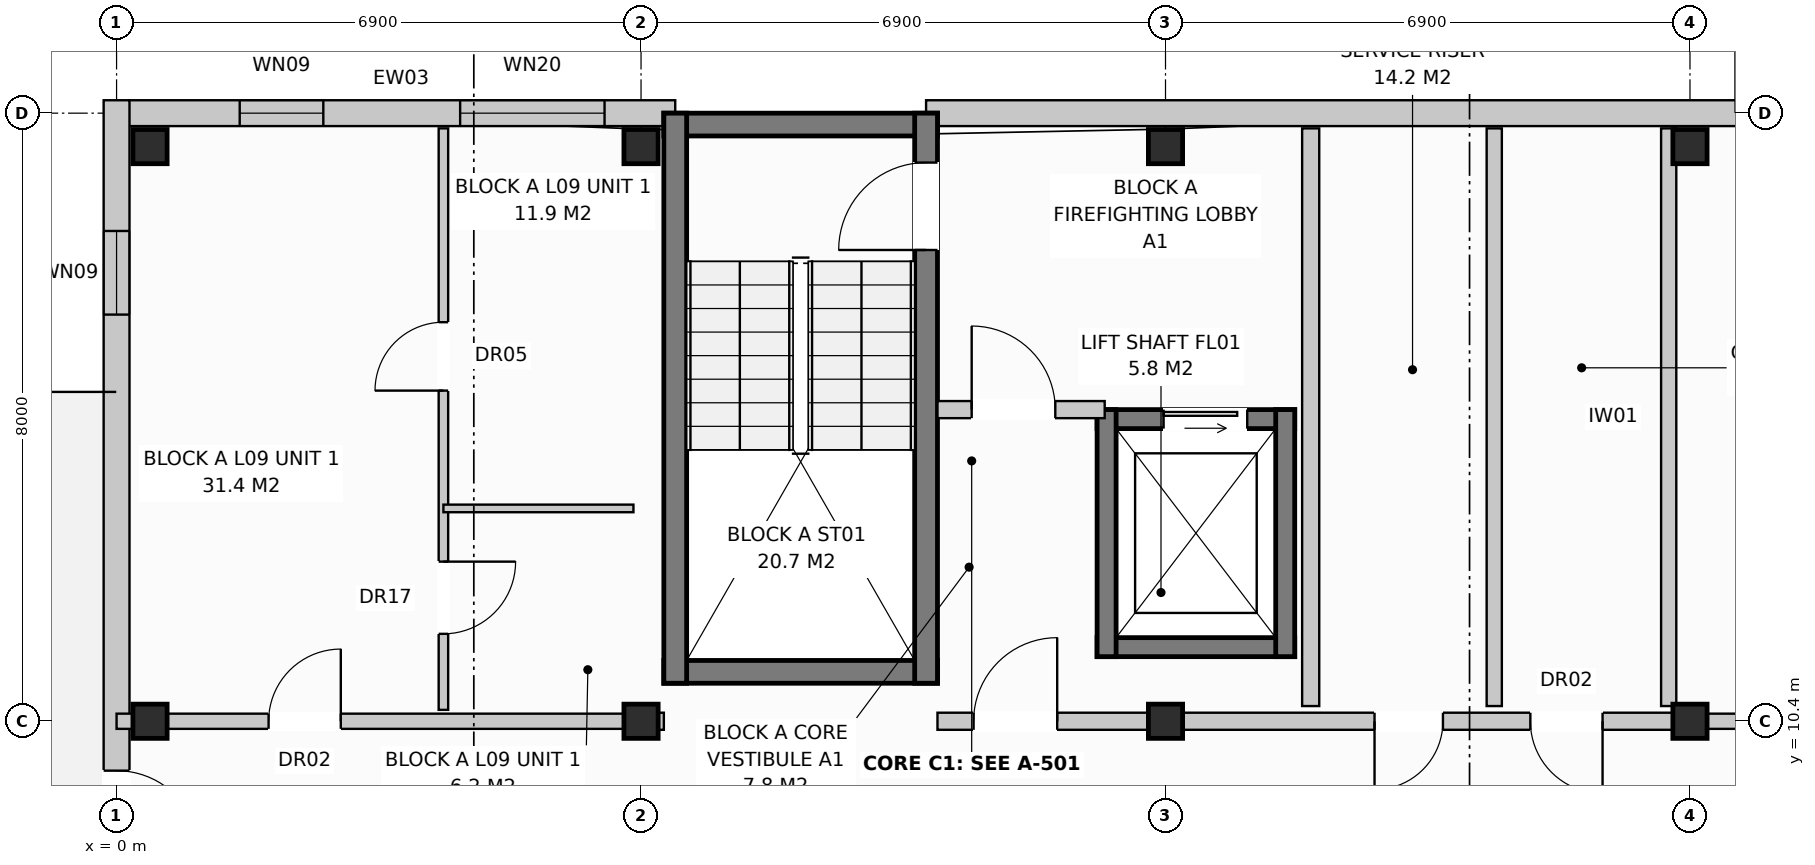
"""IFC4 building model, lengths in metres.
Left out: names, types, materials, properties, quantities, classifications, styles, units other than length and angle.
Written with IfcOpenShell. Run it as: python <this file> out.ifc"""

import sys

from ifc_helpers import new_model, si_unit, direction, frame, frame_2d, origin, origin_with_axes, origin_2d, place, context, subcontext, project, spatial, rectangle, extrude, element, fill, save


model = new_model("IFC4")
c1 = context("Model", 3, precision=1e-05, world=origin(), true_north=direction((0.0, 1.0)))
c2 = subcontext(c1, "Body", "Model", "MODEL_VIEW")
j1 = project(units=[si_unit("LENGTHUNIT", "METRE"), si_unit("PLANEANGLEUNIT", "RADIAN")], contexts=[c1])
p1 = place(None, origin())
s1 = spatial("IfcSite", under=j1, at=p1, CompositionType="ELEMENT")
p2 = place(p1, origin())
s2 = spatial("IfcBuilding", under=s1, at=p2, CompositionType="ELEMENT")
p3 = place(p2, frame((0.0, 0.0, 30.4)))
s3 = spatial("IfcBuildingStorey", under=s2, at=p3, CompositionType="ELEMENT", Elevation=30.4)
for number, where, z_axis, x_axis in (
    (1, (0.44, 10.4, 0.0), (0.0, 0.0, 1.0), (1.0, 0.0, 0.0)),
    (2, (0.44, 17.96, 0.0), (0.0, 0.0, 1.0), (1.0, 0.0, 0.0)),
    (3, (6.9, 10.4, 0.0), (0.0, 0.0, 1.0), (1.0, 0.0, 0.0)),
    (4, (6.9, 17.96, 0.0), (0.0, 0.0, 1.0), (1.0, 0.0, 0.0)),
    (5, (13.8, 10.4, 0.0), (0.0, 0.0, 1.0), (1.0, 0.0, 0.0)),
    (6, (13.8, 17.96, 0.0), (0.0, 0.0, 1.0), (1.0, 0.0, 0.0)),
    (7, (20.7, 10.4, 0.0), (0.0, 0.0, 1.0), (1.0, 0.0, 0.0)),
    (8, (20.7, 17.96, 0.0), (0.0, 0.0, 1.0), (1.0, 0.0, 0.0)),
):
    element("IfcColumn", number, at=place(p3, frame(where, z_axis=z_axis, x_axis=x_axis)), inside=s3, PredefinedType="COLUMN", context=c2, shape_type="SweptSolid", body=[
        extrude(rectangle(XDim=0.45, YDim=0.45, at=origin_2d()), origin(), (0.0, 0.0, 1.0), 3.2),
    ])
p4 = place(p3, frame((0.16, 18.4, 0.0), z_axis=(0.0, 0.0, 1.0), x_axis=(1.0, 0.0, 0.0)))
e9 = element("IfcWall", 9, at=p4, inside=s3, PredefinedType="STANDARD", context=c2, shape_type="SweptSolid", body=[
    extrude(rectangle(XDim=7.19, YDim=0.34, at=frame_2d((3.595, 0.0))), origin(), (0.0, 0.0, 1.0), 2.96),
])
p5 = place(p4, frame((1.46, 0.0, 0.72)))
e10 = element("IfcOpeningElement", 10, at=p5, cuts=e9, PredefinedType="OPENING", context=c2, shape_type="SweptSolid", body=[
    extrude(rectangle(XDim=1.1, YDim=1.5, at=frame_2d((0.55, 0.75))), frame((0.0, 0.182, 0.0), z_axis=(0.0, -1.0, 0.0), x_axis=(1.0, 0.0, 0.0)), (0.0, 0.0, 1.0), 0.364),
])
p6 = place(p4, frame((4.36, 0.0, 0.8)))
e11 = element("IfcOpeningElement", 11, at=p6, cuts=e9, PredefinedType="OPENING", context=c2, shape_type="SweptSolid", body=[
    extrude(rectangle(XDim=1.9, YDim=1.85, at=frame_2d((0.95, 0.925))), frame((0.0, 0.182, 0.0), z_axis=(0.0, -1.0, 0.0), x_axis=(1.0, 0.0, 0.0)), (0.0, 0.0, 1.0), 0.364),
])
p7 = place(p3, frame((10.65, 18.4, 0.0), z_axis=(0.0, 0.0, 1.0), x_axis=(1.0, 0.0, 0.0)))
e12 = element("IfcWall", 12, at=p7, inside=s3, PredefinedType="STANDARD", context=c2, shape_type="SweptSolid", body=[
    extrude(rectangle(XDim=17.4, YDim=0.34, at=frame_2d((8.7, 0.0))), origin(), (0.0, 0.0, 1.0), 2.96),
])
p8 = place(p7, frame((11.87, 0.0, 0.0)))
e13 = element("IfcOpeningElement", 13, at=p8, cuts=e12, PredefinedType="OPENING", context=c2, shape_type="SweptSolid", body=[
    extrude(rectangle(XDim=0.95, YDim=2.1, at=frame_2d((0.475, 1.05))), frame((0.0, 0.182, 0.0), z_axis=(0.0, -1.0, 0.0), x_axis=(1.0, 0.0, 0.0)), (0.0, 0.0, 1.0), 0.364),
])
p9 = place(p7, frame((14.87, 0.0, 0.72)))
e14 = element("IfcOpeningElement", 14, at=p9, cuts=e12, PredefinedType="OPENING", context=c2, shape_type="SweptSolid", body=[
    extrude(rectangle(XDim=1.1, YDim=1.5, at=frame_2d((0.55, 0.75))), frame((0.0, 0.182, 0.0), z_axis=(0.0, -1.0, 0.0), x_axis=(1.0, 0.0, 0.0)), (0.0, 0.0, 1.0), 0.364),
])
p10 = place(p3, frame((0.0, -0.17, 0.0), z_axis=(0.0, 0.0, 1.0), x_axis=(0.0, 1.0, 0.0)))
e15 = element("IfcWall", 15, at=p10, inside=s3, PredefinedType="STANDARD", context=c2, shape_type="SweptSolid", body=[
    extrude(rectangle(XDim=18.74, YDim=0.34, at=frame_2d((9.37, 0.0))), origin(), (0.0, 0.0, 1.0), 2.96),
])
p11 = place(p10, frame((8.82, 0.0, 0.0)))
e16 = element("IfcOpeningElement", 16, at=p11, cuts=e15, PredefinedType="OPENING", context=c2, shape_type="SweptSolid", body=[
    extrude(rectangle(XDim=1.1, YDim=2.1, at=frame_2d((0.55, 1.05))), frame((0.0, 0.182, 0.0), z_axis=(0.0, -1.0, 0.0), x_axis=(1.0, 0.0, 0.0)), (0.0, 0.0, 1.0), 0.364),
])
p12 = place(p10, frame((1.72, 0.0, 0.72)))
e17 = element("IfcOpeningElement", 17, at=p12, cuts=e15, PredefinedType="OPENING", context=c2, shape_type="SweptSolid", body=[
    extrude(rectangle(XDim=1.1, YDim=1.5, at=frame_2d((0.55, 0.75))), frame((0.0, 0.182, 0.0), z_axis=(0.0, -1.0, 0.0), x_axis=(1.0, 0.0, 0.0)), (0.0, 0.0, 1.0), 0.364),
])
p13 = place(p10, frame((15.92, 0.0, 0.72)))
e18 = element("IfcOpeningElement", 18, at=p13, cuts=e15, PredefinedType="OPENING", context=c2, shape_type="SweptSolid", body=[
    extrude(rectangle(XDim=1.1, YDim=1.5, at=frame_2d((0.55, 0.75))), frame((0.0, 0.182, 0.0), z_axis=(0.0, -1.0, 0.0), x_axis=(1.0, 0.0, 0.0)), (0.0, 0.0, 1.0), 0.364),
])
for number, where, z_axis, x_axis in (
    (19, (7.2, 18.25, 0.0), (0.0, 0.0, 1.0), (1.0, 0.0, 0.0)),
    (20, (7.2, 11.05, 0.0), (0.0, 0.0, 1.0), (1.0, 0.0, 0.0)),
):
    element("IfcWall", number, at=place(p3, frame(where, z_axis=z_axis, x_axis=x_axis)), inside=s3, PredefinedType="SHEAR", context=c2, shape_type="SweptSolid", body=[
        extrude(rectangle(XDim=3.6, YDim=0.3, at=frame_2d((1.8, 0.0))), origin(), (0.0, 0.0, 1.0), 2.96),
    ])
p14 = place(p3, frame((7.35, 10.9, 0.0), z_axis=(0.0, 0.0, 1.0), x_axis=(0.0, 1.0, 0.0)))
e21 = element("IfcWall", 21, at=p14, inside=s3, PredefinedType="SHEAR", context=c2, shape_type="SweptSolid", body=[
    extrude(rectangle(XDim=7.5, YDim=0.3, at=frame_2d((3.75, 0.0))), origin(), (0.0, 0.0, 1.0), 2.96),
])
p15 = place(p3, frame((10.65, 10.9, 0.0), z_axis=(0.0, 0.0, 1.0), x_axis=(0.0, 1.0, 0.0)))
e22 = element("IfcWall", 22, at=p15, inside=s3, PredefinedType="SHEAR", context=c2, shape_type="SweptSolid", body=[
    extrude(rectangle(XDim=7.5, YDim=0.3, at=frame_2d((3.75, 0.0))), origin(), (0.0, 0.0, 1.0), 2.96),
])
p16 = place(p15, frame((5.7, 0.0, 0.0)))
e23 = element("IfcOpeningElement", 23, at=p16, cuts=e22, PredefinedType="OPENING", context=c2, shape_type="SweptSolid", body=[
    extrude(rectangle(XDim=1.15, YDim=2.15, at=frame_2d((0.575, 1.075))), frame((0.0, 0.162, 0.0), z_axis=(0.0, -1.0, 0.0), x_axis=(1.0, 0.0, 0.0)), (0.0, 0.0, 1.0), 0.324),
])
p17 = place(p3, frame((12.9, 14.375, 0.0), z_axis=(0.0, 0.0, 1.0), x_axis=(1.0, 0.0, 0.0)))
e24 = element("IfcWall", 24, at=p17, inside=s3, PredefinedType="SHEAR", context=c2, shape_type="SweptSolid", body=[
    extrude(rectangle(XDim=2.6, YDim=0.25, at=frame_2d((1.3, 0.0))), origin(), (0.0, 0.0, 1.0), 2.96),
])
p18 = place(p17, frame((0.875, 0.0, 0.0)))
e25 = element("IfcOpeningElement", 25, at=p18, cuts=e24, PredefinedType="OPENING", context=c2, shape_type="SweptSolid", body=[
    extrude(rectangle(XDim=1.1, YDim=2.1, at=frame_2d((0.55, 1.05))), frame((0.0, 0.137, 0.0), z_axis=(0.0, -1.0, 0.0), x_axis=(1.0, 0.0, 0.0)), (0.0, 0.0, 1.0), 0.274),
])
p19 = place(p3, frame((12.9, 11.375, 0.0), z_axis=(0.0, 0.0, 1.0), x_axis=(1.0, 0.0, 0.0)))
e26 = element("IfcWall", 26, at=p19, inside=s3, PredefinedType="SHEAR", context=c2, shape_type="SweptSolid", body=[
    extrude(rectangle(XDim=2.6, YDim=0.25, at=frame_2d((1.3, 0.0))), origin(), (0.0, 0.0, 1.0), 2.96),
])
for number, where, z_axis, x_axis in (
    (27, (13.025, 11.25, 0.0), (0.0, 0.0, 1.0), (0.0, 1.0, 0.0)),
    (28, (15.375, 11.25, 0.0), (0.0, 0.0, 1.0), (0.0, 1.0, 0.0)),
):
    element("IfcWall", number, at=place(p3, frame(where, z_axis=z_axis, x_axis=x_axis)), inside=s3, PredefinedType="SHEAR", context=c2, shape_type="SweptSolid", body=[
        extrude(rectangle(XDim=3.25, YDim=0.25, at=frame_2d((1.625, 0.0))), origin(), (0.0, 0.0, 1.0), 2.96),
    ])
p20 = place(p3, frame((15.71, 10.6, 0.0), z_axis=(0.0, 0.0, 1.0), x_axis=(0.0, 1.0, 0.0)))
e29 = element("IfcWall", 29, at=p20, inside=s3, PredefinedType="PARTITIONING", context=c2, shape_type="SweptSolid", body=[
    extrude(rectangle(XDim=7.6, YDim=0.225, at=frame_2d((3.8, 0.0))), origin(), (0.0, 0.0, 1.0), 2.59),
])
p21 = place(p3, frame((10.8, 14.5, 0.0), z_axis=(0.0, 0.0, 1.0), x_axis=(1.0, 0.0, 0.0)))
e30 = element("IfcWall", 30, at=p21, inside=s3, PredefinedType="PARTITIONING", context=c2, shape_type="SweptSolid", body=[
    extrude(rectangle(XDim=2.2, YDim=0.225, at=frame_2d((1.1, 0.0))), origin(), (0.0, 0.0, 1.0), 2.96),
])
p22 = place(p21, frame((0.45, 0.0, 0.0)))
e31 = element("IfcOpeningElement", 31, at=p22, cuts=e30, PredefinedType="OPENING", context=c2, shape_type="SweptSolid", body=[
    extrude(rectangle(XDim=1.1, YDim=2.15, at=frame_2d((0.55, 1.075))), frame((0.0, 0.125, 0.0), z_axis=(0.0, -1.0, 0.0), x_axis=(1.0, 0.0, 0.0)), (0.0, 0.0, 1.0), 0.249),
])
p23 = place(p3, frame((6.9, 10.4, 0.0), z_axis=(0.0, 0.0, 1.0), x_axis=(1.0, 0.0, 0.0)))
e32 = element("IfcWall", 32, at=p23, inside=s3, PredefinedType="PARTITIONING", context=c2, shape_type="SweptSolid", body=[
    extrude(rectangle(XDim=0.3, YDim=0.225, at=frame_2d((0.15, 0.0))), origin(), (0.0, 0.0, 1.0), 2.96),
])
for number, where, z_axis, x_axis in (
    (33, (18.125, 10.6, 0.0), (0.0, 0.0, 1.0), (0.0, 1.0, 0.0)),
    (34, (20.42, 10.6, 0.0), (0.0, 0.0, 1.0), (0.0, 1.0, 0.0)),
):
    element("IfcWall", number, at=place(p3, frame(where, z_axis=z_axis, x_axis=x_axis)), inside=s3, PredefinedType="PARTITIONING", context=c2, shape_type="SweptSolid", body=[
        extrude(rectangle(XDim=7.6, YDim=0.2, at=frame_2d((3.8, 0.0))), origin(), (0.0, 0.0, 1.0), 2.96),
    ])
p24 = place(p3, frame((10.8, 10.4, 0.0), z_axis=(0.0, 0.0, 1.0), x_axis=(1.0, 0.0, 0.0)))
e35 = element("IfcWall", 35, at=p24, inside=s3, PredefinedType="PARTITIONING", context=c2, shape_type="SweptSolid", body=[
    extrude(rectangle(XDim=9.9, YDim=0.225, at=frame_2d((4.95, 0.0))), origin(), (0.0, 0.0, 1.0), 2.4),
])
p25 = place(p24, frame((0.475, 0.0, 0.0)))
e36 = element("IfcOpeningElement", 36, at=p25, cuts=e35, PredefinedType="OPENING", context=c2, shape_type="SweptSolid", body=[
    extrude(rectangle(XDim=1.1, YDim=2.15, at=frame_2d((0.55, 1.075))), frame((0.0, 0.125, 0.0), z_axis=(0.0, -1.0, 0.0), x_axis=(1.0, 0.0, 0.0)), (0.0, 0.0, 1.0), 0.249),
])
p26 = place(p24, frame((5.75, 0.0, 0.0)))
e37 = element("IfcOpeningElement", 37, at=p26, cuts=e35, PredefinedType="OPENING", context=c2, shape_type="SweptSolid", body=[
    extrude(rectangle(XDim=0.9, YDim=2.1, at=frame_2d((0.45, 1.05))), frame((0.0, 0.125, 0.0), z_axis=(0.0, -1.0, 0.0), x_axis=(1.0, 0.0, 0.0)), (0.0, 0.0, 1.0), 0.249),
])
p27 = place(p24, frame((7.8, 0.0, 0.0)))
e38 = element("IfcOpeningElement", 38, at=p27, cuts=e35, PredefinedType="OPENING", context=c2, shape_type="SweptSolid", body=[
    extrude(rectangle(XDim=0.95, YDim=2.15, at=frame_2d((0.475, 1.075))), frame((0.0, 0.125, 0.0), z_axis=(0.0, -1.0, 0.0), x_axis=(1.0, 0.0, 0.0)), (0.0, 0.0, 1.0), 0.249),
])
p28 = place(p3, frame((0.0, 10.4, 0.0), z_axis=(0.0, 0.0, 1.0), x_axis=(1.0, 0.0, 0.0)))
e39 = element("IfcWall", 39, at=p28, inside=s3, PredefinedType="PARTITIONING", context=c2, shape_type="SweptSolid", body=[
    extrude(rectangle(XDim=6.9, YDim=0.2, at=frame_2d((3.45, 0.0))), origin(), (0.0, 0.0, 1.0), 2.4),
])
p29 = place(p28, frame((2.0, 0.0, 0.0)))
e40 = element("IfcOpeningElement", 40, at=p29, cuts=e39, PredefinedType="OPENING", context=c2, shape_type="SweptSolid", body=[
    extrude(rectangle(XDim=0.95, YDim=2.15, at=frame_2d((0.475, 1.075))), frame((0.0, 0.112, 0.0), z_axis=(0.0, -1.0, 0.0), x_axis=(1.0, 0.0, 0.0)), (0.0, 0.0, 1.0), 0.224),
])
p30 = place(p3, frame((4.3, 10.55, 0.0), z_axis=(0.0, 0.0, 1.0), x_axis=(0.0, 1.0, 0.0)))
e41 = element("IfcWall", 41, at=p30, inside=s3, PredefinedType="PARTITIONING", context=c2, shape_type="SweptSolid", body=[
    extrude(rectangle(XDim=7.65, YDim=0.125, at=frame_2d((3.825, 0.0))), origin(), (0.0, 0.0, 1.0), 2.96),
])
p31 = place(p30, frame((1.0, 0.0, 0.0)))
e42 = element("IfcOpeningElement", 42, at=p31, cuts=e41, PredefinedType="OPENING", context=c2, shape_type="SweptSolid", body=[
    extrude(rectangle(XDim=0.95, YDim=2.1, at=frame_2d((0.475, 1.05))), frame((0.0, 0.074, 0.0), z_axis=(0.0, -1.0, 0.0), x_axis=(1.0, 0.0, 0.0)), (0.0, 0.0, 1.0), 0.149),
])
p32 = place(p30, frame((4.2, 0.0, 0.0)))
e43 = element("IfcOpeningElement", 43, at=p32, cuts=e41, PredefinedType="OPENING", context=c2, shape_type="SweptSolid", body=[
    extrude(rectangle(XDim=0.9, YDim=2.1, at=frame_2d((0.45, 1.05))), frame((0.0, 0.074, 0.0), z_axis=(0.0, -1.0, 0.0), x_axis=(1.0, 0.0, 0.0)), (0.0, 0.0, 1.0), 0.149),
])
p33 = place(p3, frame((4.3, 13.2, 0.0), z_axis=(0.0, 0.0, 1.0), x_axis=(1.0, 0.0, 0.0)))
e44 = element("IfcWall", 44, at=p33, inside=s3, PredefinedType="PARTITIONING", context=c2, shape_type="SweptSolid", body=[
    extrude(rectangle(XDim=2.5, YDim=0.1, at=frame_2d((1.25, 0.0))), origin(), (0.0, 0.0, 1.0), 2.96),
])
p34 = place(p3, frame((20.7, 10.4, 0.0), z_axis=(0.0, 0.0, 1.0), x_axis=(1.0, 0.0, 0.0)))
e45 = element("IfcWall", 45, at=p34, inside=s3, PredefinedType="PARTITIONING", context=c2, shape_type="SweptSolid", body=[
    extrude(rectangle(XDim=6.9, YDim=0.2, at=frame_2d((3.45, 0.0))), origin(), (0.0, 0.0, 1.0), 2.4),
])
p35 = place(p34, frame((2.0, 0.0, 0.0)))
e46 = element("IfcOpeningElement", 46, at=p35, cuts=e45, PredefinedType="OPENING", context=c2, shape_type="SweptSolid", body=[
    extrude(rectangle(XDim=0.95, YDim=2.15, at=frame_2d((0.475, 1.075))), frame((0.0, 0.112, 0.0), z_axis=(0.0, -1.0, 0.0), x_axis=(1.0, 0.0, 0.0)), (0.0, 0.0, 1.0), 0.224),
])
p36 = place(p5, origin_with_axes())
e47 = element("IfcWindow", 47, at=p36, inside=s3, PartitioningType="SINGLE_PANEL", PredefinedType="WINDOW", context=c2, shape_type="SweptSolid", body=[
    extrude(rectangle(XDim=1.1, YDim=1.5, at=frame_2d((0.55, 0.75))), frame((0.0, 0.03, 0.0), z_axis=(0.0, -1.0, 0.0), x_axis=(1.0, 0.0, 0.0)), (0.0, 0.0, 1.0), 0.06),
])
fill(e10, e47)
p37 = place(p6, origin_with_axes())
e48 = element("IfcWindow", 48, at=p37, inside=s3, PartitioningType="SINGLE_PANEL", PredefinedType="WINDOW", context=c2, shape_type="SweptSolid", body=[
    extrude(rectangle(XDim=1.9, YDim=1.85, at=frame_2d((0.95, 0.925))), frame((0.0, 0.03, 0.0), z_axis=(0.0, -1.0, 0.0), x_axis=(1.0, 0.0, 0.0)), (0.0, 0.0, 1.0), 0.06),
])
fill(e11, e48)
p38 = place(p11, frame((1.1, 0.0, 0.0), z_axis=(0.0, 0.0, 1.0), x_axis=(-1.0, 0.0, 0.0)))
e49 = element("IfcDoor", 49, at=p38, inside=s3, OperationType="SINGLE_SWING_LEFT", PredefinedType="DOOR", context=c2, shape_type="SweptSolid", body=[
    extrude(rectangle(XDim=1.1, YDim=2.1, at=frame_2d((0.55, 1.05))), frame((0.0, 0.025, 0.0), z_axis=(0.0, -1.0, 0.0), x_axis=(1.0, 0.0, 0.0)), (0.0, 0.0, 1.0), 0.05),
])
fill(e16, e49)
p39 = place(p13, origin_with_axes())
e50 = element("IfcWindow", 50, at=p39, inside=s3, PartitioningType="SINGLE_PANEL", PredefinedType="WINDOW", context=c2, shape_type="SweptSolid", body=[
    extrude(rectangle(XDim=1.1, YDim=1.5, at=frame_2d((0.55, 0.75))), frame((0.0, 0.03, 0.0), z_axis=(0.0, -1.0, 0.0), x_axis=(1.0, 0.0, 0.0)), (0.0, 0.0, 1.0), 0.06),
])
fill(e18, e50)
p40 = place(p16, origin_with_axes())
e51 = element("IfcDoor", 51, at=p40, inside=s3, OperationType="SINGLE_SWING_LEFT", PredefinedType="DOOR", context=c2, shape_type="SweptSolid", body=[
    extrude(rectangle(XDim=1.15, YDim=2.15, at=frame_2d((0.575, 1.075))), frame((0.0, 0.025, 0.0), z_axis=(0.0, -1.0, 0.0), x_axis=(1.0, 0.0, 0.0)), (0.0, 0.0, 1.0), 0.05),
])
fill(e23, e51)
p41 = place(p18, origin_with_axes())
e52 = element("IfcDoor", 52, at=p41, inside=s3, OperationType="SLIDING_TO_LEFT", PredefinedType="DOOR", context=c2, shape_type="SweptSolid", body=[
    extrude(rectangle(XDim=1.1, YDim=2.1, at=frame_2d((0.55, 1.05))), frame((0.0, 0.025, 0.0), z_axis=(0.0, -1.0, 0.0), x_axis=(1.0, 0.0, 0.0)), (0.0, 0.0, 1.0), 0.05),
])
fill(e25, e52)
p42 = place(p22, origin_with_axes())
e53 = element("IfcDoor", 53, at=p42, inside=s3, OperationType="SINGLE_SWING_LEFT", PredefinedType="DOOR", context=c2, shape_type="SweptSolid", body=[
    extrude(rectangle(XDim=1.1, YDim=2.15, at=frame_2d((0.55, 1.075))), frame((0.0, 0.025, 0.0), z_axis=(0.0, -1.0, 0.0), x_axis=(1.0, 0.0, 0.0)), (0.0, 0.0, 1.0), 0.05),
])
fill(e31, e53)
p43 = place(p25, origin_with_axes())
e54 = element("IfcDoor", 54, at=p43, inside=s3, OperationType="SINGLE_SWING_RIGHT", PredefinedType="DOOR", context=c2, shape_type="SweptSolid", body=[
    extrude(rectangle(XDim=1.1, YDim=2.15, at=frame_2d((0.55, 1.075))), frame((0.0, 0.025, 0.0), z_axis=(0.0, -1.0, 0.0), x_axis=(1.0, 0.0, 0.0)), (0.0, 0.0, 1.0), 0.05),
])
fill(e36, e54)
p44 = place(p26, frame((0.9, 0.0, 0.0), z_axis=(0.0, 0.0, 1.0), x_axis=(-1.0, 0.0, 0.0)))
e55 = element("IfcDoor", 55, at=p44, inside=s3, OperationType="SINGLE_SWING_LEFT", PredefinedType="DOOR", context=c2, shape_type="SweptSolid", body=[
    extrude(rectangle(XDim=0.9, YDim=2.1, at=frame_2d((0.45, 1.05))), frame((0.0, 0.025, 0.0), z_axis=(0.0, -1.0, 0.0), x_axis=(1.0, 0.0, 0.0)), (0.0, 0.0, 1.0), 0.05),
])
fill(e37, e55)
p45 = place(p27, frame((0.95, 0.0, 0.0), z_axis=(0.0, 0.0, 1.0), x_axis=(-1.0, 0.0, 0.0)))
e56 = element("IfcDoor", 56, at=p45, inside=s3, OperationType="SINGLE_SWING_RIGHT", PredefinedType="DOOR", context=c2, shape_type="SweptSolid", body=[
    extrude(rectangle(XDim=0.95, YDim=2.15, at=frame_2d((0.475, 1.075))), frame((0.0, 0.025, 0.0), z_axis=(0.0, -1.0, 0.0), x_axis=(1.0, 0.0, 0.0)), (0.0, 0.0, 1.0), 0.05),
])
fill(e38, e56)
p46 = place(p29, origin_with_axes())
e57 = element("IfcDoor", 57, at=p46, inside=s3, OperationType="SINGLE_SWING_RIGHT", PredefinedType="DOOR", context=c2, shape_type="SweptSolid", body=[
    extrude(rectangle(XDim=0.95, YDim=2.15, at=frame_2d((0.475, 1.075))), frame((0.0, 0.025, 0.0), z_axis=(0.0, -1.0, 0.0), x_axis=(1.0, 0.0, 0.0)), (0.0, 0.0, 1.0), 0.05),
])
fill(e40, e57)
p47 = place(p31, frame((0.95, 0.0, 0.0), z_axis=(0.0, 0.0, 1.0), x_axis=(-1.0, 0.0, 0.0)))
e58 = element("IfcDoor", 58, at=p47, inside=s3, OperationType="SINGLE_SWING_RIGHT", PredefinedType="DOOR", context=c2, shape_type="SweptSolid", body=[
    extrude(rectangle(XDim=0.95, YDim=2.1, at=frame_2d((0.475, 1.05))), frame((0.0, 0.025, 0.0), z_axis=(0.0, -1.0, 0.0), x_axis=(1.0, 0.0, 0.0)), (0.0, 0.0, 1.0), 0.05),
])
fill(e42, e58)
p48 = place(p32, origin_with_axes())
e59 = element("IfcDoor", 59, at=p48, inside=s3, OperationType="SINGLE_SWING_LEFT", PredefinedType="DOOR", context=c2, shape_type="SweptSolid", body=[
    extrude(rectangle(XDim=0.9, YDim=2.1, at=frame_2d((0.45, 1.05))), frame((0.0, 0.025, 0.0), z_axis=(0.0, -1.0, 0.0), x_axis=(1.0, 0.0, 0.0)), (0.0, 0.0, 1.0), 0.05),
])
fill(e43, e59)
save(model, sys.argv[1])
